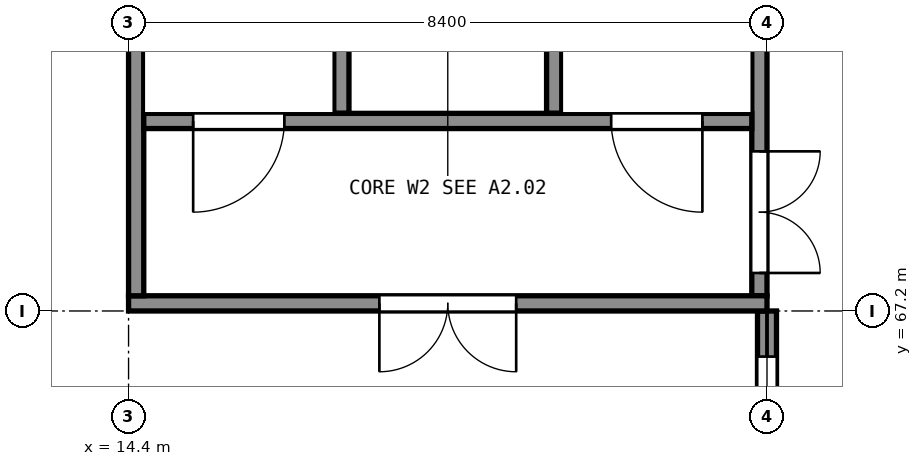
"""IFC4 building model, lengths in metres.
Left out: names, types, materials, properties, quantities, classifications, styles, units other than length and angle.
Written with IfcOpenShell. Run it as: python <this file> out.ifc"""

import sys

from ifc_helpers import new_model, si_unit, direction, frame, frame_2d, origin, place, context, subcontext, project, spatial, rectangle, extrude, element, fill, save


model = new_model("IFC4")
c1 = context("Model", 3, precision=1e-05, world=origin(), true_north=direction((0.0, 1.0)))
c2 = subcontext(c1, "Body", "Model", "MODEL_VIEW")
j1 = project(units=[si_unit("LENGTHUNIT", "METRE"), si_unit("PLANEANGLEUNIT", "RADIAN")], contexts=[c1])
p1 = place(None, origin())
s1 = spatial("IfcSite", under=j1, at=p1, CompositionType="ELEMENT")
p2 = place(p1, origin())
s2 = spatial("IfcBuilding", under=s1, at=p2, CompositionType="ELEMENT")
p3 = place(p2, origin())
s3 = spatial("IfcBuildingStorey", under=s2, at=p3, CompositionType="ELEMENT", Elevation=0.0)
p4 = place(p3, frame((14.4, 67.3, -1.8), z_axis=(0.0, 0.0, 1.0), x_axis=(1.0, 0.0, 0.0)))
e1 = element("IfcWall", 1, at=p4, inside=s3, PredefinedType="SHEAR", context=c2, shape_type="SweptSolid", body=[
    extrude(rectangle(XDim=8.4, YDim=0.2, at=frame_2d((4.2, 0.0))), origin(), (0.0, 0.0, 1.0), 7.3),
])
p5 = place(p4, frame((3.3, 0.0, 1.8)))
e2 = element("IfcOpeningElement", 2, at=p5, cuts=e1, PredefinedType="OPENING", context=c2, shape_type="SweptSolid", body=[
    extrude(rectangle(XDim=1.8, YDim=2.1, at=frame_2d((0.9, 1.05))), frame((0.0, 0.11, 0.0), z_axis=(0.0, -1.0, 0.0), x_axis=(1.0, 0.0, 0.0)), (0.0, 0.0, 1.0), 0.22),
])
p6 = place(p3, frame((14.5, 67.4, -1.8), z_axis=(0.0, 0.0, 1.0), x_axis=(0.0, 1.0, 0.0)))
e3 = element("IfcWall", 3, at=p6, inside=s3, PredefinedType="SHEAR", context=c2, shape_type="SweptSolid", body=[
    extrude(rectangle(XDim=8.0, YDim=0.2, at=frame_2d((4.0, 0.0))), origin(), (0.0, 0.0, 1.0), 7.3),
])
p7 = place(p3, frame((22.7, 75.4, -1.8), z_axis=(0.0, 0.0, 1.0), x_axis=(0.0, -1.0, 0.0)))
e4 = element("IfcWall", 4, at=p7, inside=s3, PredefinedType="SHEAR", context=c2, shape_type="SweptSolid", body=[
    extrude(rectangle(XDim=8.0, YDim=0.2, at=frame_2d((4.0, 0.0))), origin(), (0.0, 0.0, 1.0), 7.3),
])
p8 = place(p7, frame((6.1, 0.0, 1.8)))
e5 = element("IfcOpeningElement", 5, at=p8, cuts=e4, PredefinedType="OPENING", context=c2, shape_type="SweptSolid", body=[
    extrude(rectangle(XDim=1.6, YDim=2.1, at=frame_2d((0.8, 1.05))), frame((0.0, 0.11, 0.0), z_axis=(0.0, -1.0, 0.0), x_axis=(1.0, 0.0, 0.0)), (0.0, 0.0, 1.0), 0.22),
])
p9 = place(p3, frame((14.6, 69.7, -1.8), z_axis=(0.0, 0.0, 1.0), x_axis=(1.0, 0.0, 0.0)))
e6 = element("IfcWall", 6, at=p9, inside=s3, PredefinedType="SHEAR", context=c2, shape_type="SweptSolid", body=[
    extrude(rectangle(XDim=8.0, YDim=0.2, at=frame_2d((4.0, 0.0))), origin(), (0.0, 0.0, 1.0), 7.3),
])
p10 = place(p9, frame((0.65, 0.0, 1.8)))
e7 = element("IfcOpeningElement", 7, at=p10, cuts=e6, PredefinedType="OPENING", context=c2, shape_type="SweptSolid", body=[
    extrude(rectangle(XDim=1.2, YDim=2.1, at=frame_2d((0.6, 1.05))), frame((0.0, 0.11, 0.0), z_axis=(0.0, -1.0, 0.0), x_axis=(1.0, 0.0, 0.0)), (0.0, 0.0, 1.0), 0.22),
])
p11 = place(p9, frame((6.15, 0.0, 1.8)))
e8 = element("IfcOpeningElement", 8, at=p11, cuts=e6, PredefinedType="OPENING", context=c2, shape_type="SweptSolid", body=[
    extrude(rectangle(XDim=1.2, YDim=2.1, at=frame_2d((0.6, 1.05))), frame((0.0, 0.11, 0.0), z_axis=(0.0, -1.0, 0.0), x_axis=(1.0, 0.0, 0.0)), (0.0, 0.0, 1.0), 0.22),
])
for number, where, z_axis, x_axis in (
    (9, (17.2, 69.8, -1.8), (0.0, 0.0, 1.0), (0.0, 1.0, 0.0)),
    (10, (20.0, 69.8, -1.8), (0.0, 0.0, 1.0), (0.0, 1.0, 0.0)),
):
    element("IfcWall", number, at=place(p3, frame(where, z_axis=z_axis, x_axis=x_axis)), inside=s3, PredefinedType="SHEAR", context=c2, shape_type="SweptSolid", body=[
        extrude(rectangle(XDim=5.6, YDim=0.2, at=frame_2d((2.8, 0.0))), origin(), (0.0, 0.0, 1.0), 7.3),
    ])
p12 = place(p3, frame((22.8, 59.2, 0.0), z_axis=(0.0, 0.0, 1.0), x_axis=(0.0, 1.0, 0.0)))
e11 = element("IfcWall", 11, at=p12, inside=s3, PredefinedType="SOLIDWALL", context=c2, shape_type="SweptSolid", body=[
    extrude(rectangle(XDim=8.0, YDim=0.25, at=frame_2d((4.0, 0.0))), origin(), (0.0, 0.0, 1.0), 4.44),
])
p13 = place(p12, frame((0.6, 0.0, 0.9)))
e12 = element("IfcOpeningElement", 12, at=p13, cuts=e11, PredefinedType="OPENING", context=c2, shape_type="SweptSolid", body=[
    extrude(rectangle(XDim=1.2, YDim=2.1, at=frame_2d((0.6, 1.05))), frame((0.0, 0.135, 0.0), z_axis=(0.0, -1.0, 0.0), x_axis=(1.0, 0.0, 0.0)), (0.0, 0.0, 1.0), 0.27),
])
p14 = place(p12, frame((3.95, 0.0, 0.9)))
e13 = element("IfcOpeningElement", 13, at=p14, cuts=e11, PredefinedType="OPENING", context=c2, shape_type="SweptSolid", body=[
    extrude(rectangle(XDim=1.2, YDim=2.1, at=frame_2d((0.6, 1.05))), frame((0.0, 0.135, 0.0), z_axis=(0.0, -1.0, 0.0), x_axis=(1.0, 0.0, 0.0)), (0.0, 0.0, 1.0), 0.27),
])
p15 = place(p12, frame((6.2, 0.0, 0.9)))
e14 = element("IfcOpeningElement", 14, at=p15, cuts=e11, PredefinedType="OPENING", context=c2, shape_type="SweptSolid", body=[
    extrude(rectangle(XDim=1.2, YDim=2.1, at=frame_2d((0.6, 1.05))), frame((0.0, 0.135, 0.0), z_axis=(0.0, -1.0, 0.0), x_axis=(1.0, 0.0, 0.0)), (0.0, 0.0, 1.0), 0.27),
])
p16 = place(p15, origin())
e15 = element("IfcWindow", 15, at=p16, inside=s3, PartitioningType="SINGLE_PANEL", PredefinedType="WINDOW", context=c2, shape_type="SweptSolid", body=[
    extrude(rectangle(XDim=1.2, YDim=2.1, at=frame_2d((0.6, 1.05))), frame((0.0, 0.105, 0.0), z_axis=(0.0, -1.0, 0.0), x_axis=(1.0, 0.0, 0.0)), (0.0, 0.0, 1.0), 0.06),
])
fill(e14, e15)
p17 = place(p8, origin())
e16 = element("IfcDoor", 16, at=p17, inside=s3, OperationType="DOUBLE_DOOR_SINGLE_SWING", PredefinedType="DOOR", context=c2, shape_type="SweptSolid", body=[
    extrude(rectangle(XDim=1.6, YDim=2.1, at=frame_2d((0.8, 1.05))), frame((0.0, 0.025, 0.0), z_axis=(0.0, -1.0, 0.0), x_axis=(1.0, 0.0, 0.0)), (0.0, 0.0, 1.0), 0.05),
])
fill(e5, e16)
p18 = place(p5, origin())
e17 = element("IfcDoor", 17, at=p18, inside=s3, OperationType="DOUBLE_DOOR_SINGLE_SWING", PredefinedType="DOOR", context=c2, shape_type="SweptSolid", body=[
    extrude(rectangle(XDim=1.8, YDim=2.1, at=frame_2d((0.9, 1.05))), frame((0.0, 0.025, 0.0), z_axis=(0.0, -1.0, 0.0), x_axis=(1.0, 0.0, 0.0)), (0.0, 0.0, 1.0), 0.05),
])
fill(e2, e17)
p19 = place(p10, origin())
e18 = element("IfcDoor", 18, at=p19, inside=s3, OperationType="SINGLE_SWING_LEFT", PredefinedType="DOOR", context=c2, shape_type="SweptSolid", body=[
    extrude(rectangle(XDim=1.2, YDim=2.1, at=frame_2d((0.6, 1.05))), frame((0.0, 0.025, 0.0), z_axis=(0.0, -1.0, 0.0), x_axis=(1.0, 0.0, 0.0)), (0.0, 0.0, 1.0), 0.05),
])
fill(e7, e18)
p20 = place(p11, origin())
e19 = element("IfcDoor", 19, at=p20, inside=s3, OperationType="SINGLE_SWING_RIGHT", PredefinedType="DOOR", context=c2, shape_type="SweptSolid", body=[
    extrude(rectangle(XDim=1.2, YDim=2.1, at=frame_2d((0.6, 1.05))), frame((0.0, 0.025, 0.0), z_axis=(0.0, -1.0, 0.0), x_axis=(1.0, 0.0, 0.0)), (0.0, 0.0, 1.0), 0.05),
])
fill(e8, e19)
save(model, sys.argv[1])
